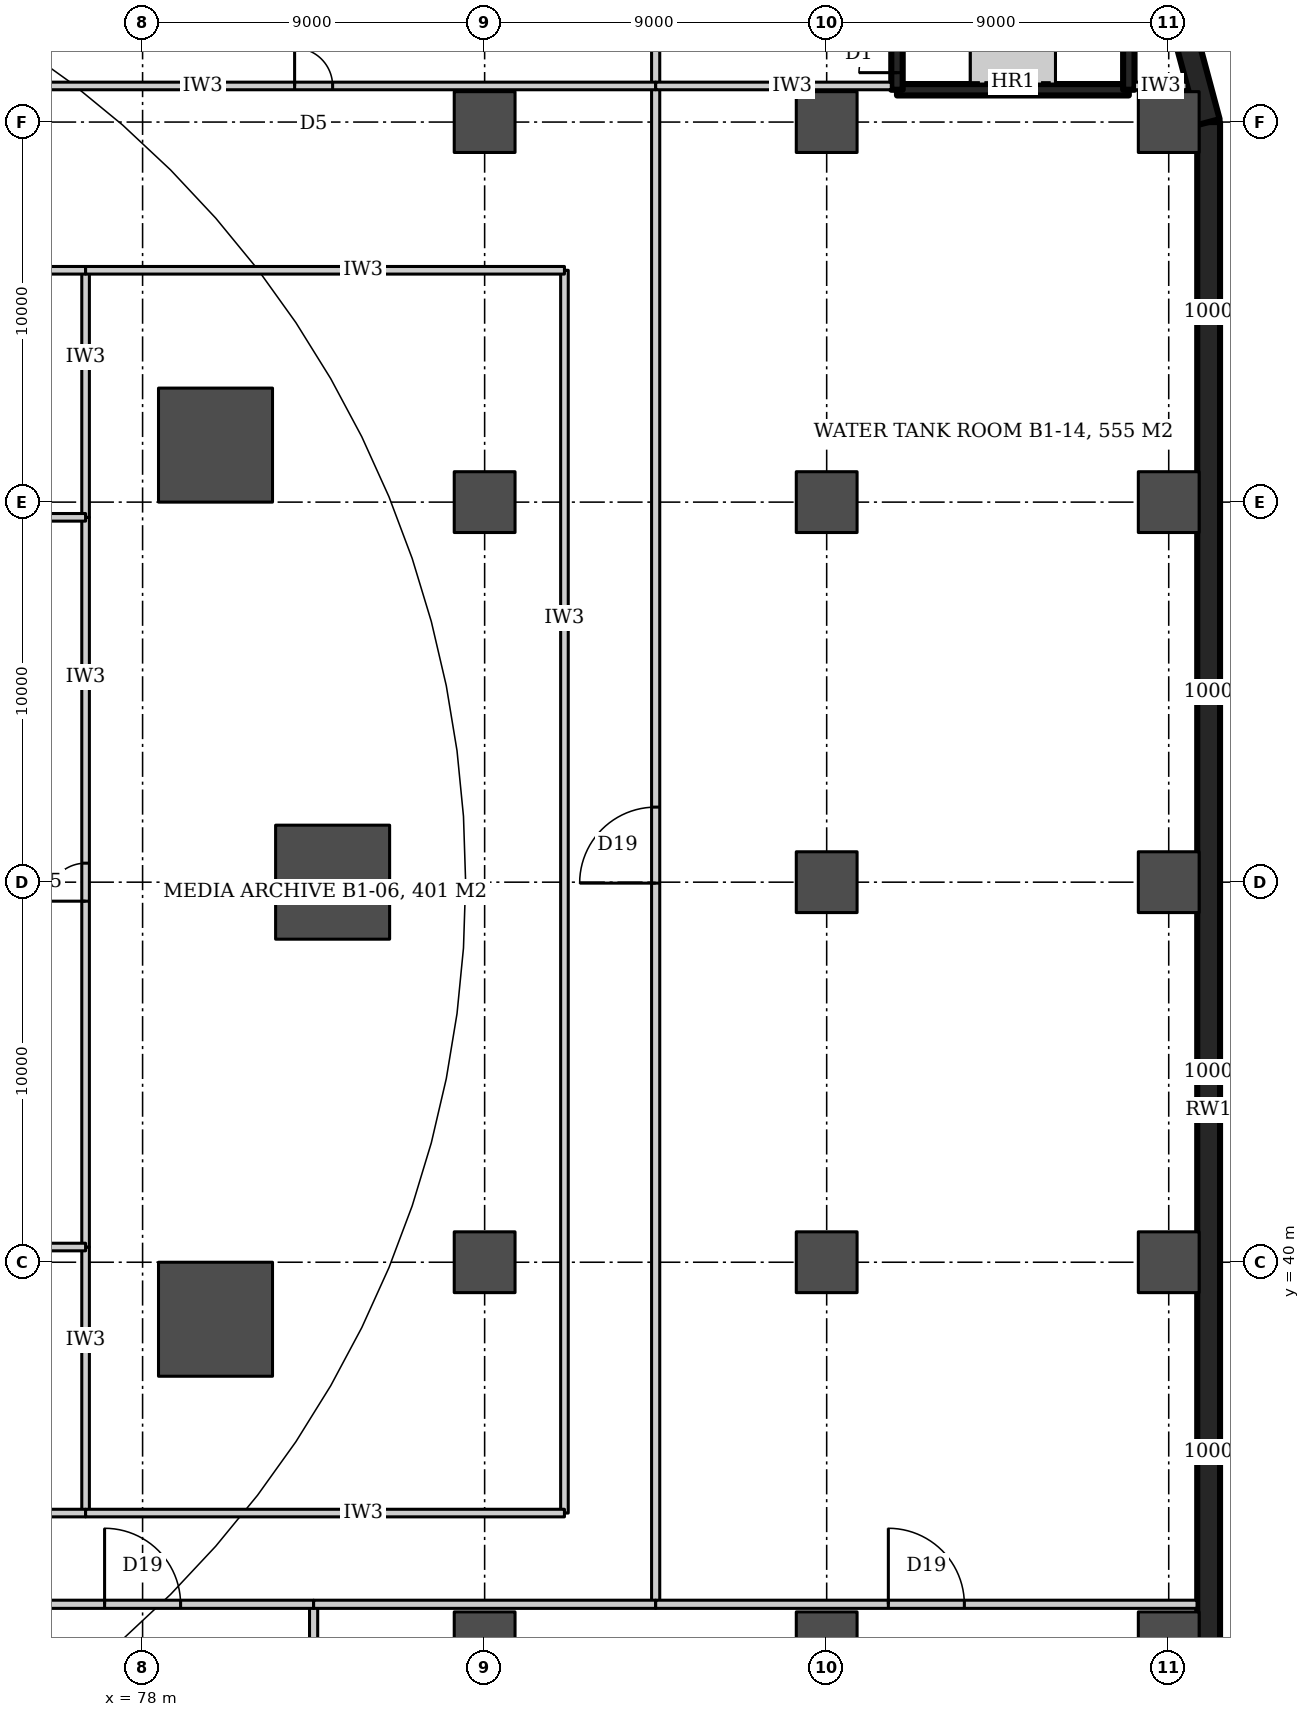
"""IFC4 building model, lengths in metres.
Left out: names, types, materials, properties, quantities, classifications, styles, units other than length and angle.
Written with IfcOpenShell. Run it as: python <this file> out.ifc"""

import sys

from ifc_helpers import new_model, si_unit, direction, frame, frame_2d, origin, origin_2d, place, context, subcontext, project, spatial, rectangle, circle, extrude, element, fill, save


model = new_model("IFC4")
c1 = context("Model", 3, precision=1e-05, world=origin(), true_north=direction((0.0, 1.0)))
c2 = subcontext(c1, "Body", "Model", "MODEL_VIEW")
j1 = project(units=[si_unit("LENGTHUNIT", "METRE"), si_unit("PLANEANGLEUNIT", "RADIAN")], contexts=[c1])
p1 = place(None, origin())
s1 = spatial("IfcSite", under=j1, at=p1, CompositionType="ELEMENT")
p2 = place(p1, origin())
s2 = spatial("IfcBuilding", under=s1, at=p2, CompositionType="ELEMENT")
p3 = place(p2, frame((0.0, 0.0, -6.0)))
s3 = spatial("IfcBuildingStorey", under=s2, at=p3, CompositionType="ELEMENT", Elevation=-6.0)
p4 = place(p3, frame((106.05, 30.0, -0.5), z_axis=(0.0, 0.0, 1.0), x_axis=(0.0, 1.0, 0.0)))
e1 = element("IfcWall", 1, at=p4, inside=s3, PredefinedType="SOLIDWALL", context=c2, shape_type="SweptSolid", body=[
    extrude(rectangle(XDim=40.0, YDim=0.6, at=frame_2d((20.0, 0.0))), origin(), (0.0, 0.0, 1.0), 6.2),
])
p5 = place(p3, frame((106.05, 70.0, -0.5), z_axis=(0.0, 0.0, 1.0), x_axis=(-0.258831381584, 0.965922520654, 0.0)))
e2 = element("IfcWall", 2, at=p5, inside=s3, PredefinedType="SOLIDWALL", context=c2, shape_type="SweptSolid", body=[
    extrude(rectangle(XDim=5.72, YDim=0.6, at=frame_2d((2.86, 0.0))), origin(), (0.0, 0.0, 1.0), 6.2),
])
for number, where, z_axis, x_axis in (
    (3, (87.0, 30.0, -0.5), (0.0, 0.0, 1.0), (1.0, 0.0, 0.0)),
    (4, (96.0, 30.0, -0.5), (0.0, 0.0, 1.0), (1.0, 0.0, 0.0)),
    (5, (105.0, 30.0, -0.5), (0.0, 0.0, 1.0), (1.0, 0.0, 0.0)),
    (6, (87.0, 40.0, -0.5), (0.0, 0.0, 1.0), (1.0, 0.0, 0.0)),
    (7, (96.0, 40.0, -0.5), (0.0, 0.0, 1.0), (1.0, 0.0, 0.0)),
    (8, (105.0, 40.0, -0.5), (0.0, 0.0, 1.0), (1.0, 0.0, 0.0)),
    (9, (96.0, 50.0, -0.5), (0.0, 0.0, 1.0), (1.0, 0.0, 0.0)),
    (10, (105.0, 50.0, -0.5), (0.0, 0.0, 1.0), (1.0, 0.0, 0.0)),
    (11, (87.0, 60.0, -0.5), (0.0, 0.0, 1.0), (1.0, 0.0, 0.0)),
    (12, (96.0, 60.0, -0.5), (0.0, 0.0, 1.0), (1.0, 0.0, 0.0)),
    (13, (105.0, 60.0, -0.5), (0.0, 0.0, 1.0), (1.0, 0.0, 0.0)),
    (14, (87.0, 70.0, -0.5), (0.0, 0.0, 1.0), (1.0, 0.0, 0.0)),
    (15, (96.0, 70.0, -0.5), (0.0, 0.0, 1.0), (1.0, 0.0, 0.0)),
    (16, (105.0, 70.0, -0.5), (0.0, 0.0, 1.0), (1.0, 0.0, 0.0)),
):
    element("IfcColumn", number, at=place(p3, frame(where, z_axis=z_axis, x_axis=x_axis)), inside=s3, PredefinedType="COLUMN", context=c2, shape_type="SweptSolid", body=[
        extrude(rectangle(XDim=1.6, YDim=1.6, at=origin_2d()), origin(), (0.0, 0.0, 1.0), 6.5),
    ])
for number, where, z_axis, x_axis in (
    (17, (83.0, 50.0, 0.0), (0.0, 0.0, 1.0), (1.0, 0.0, 0.0)),
    (18, (79.919, 61.5, 0.0), (0.0, 0.0, 1.0), (1.0, 0.0, 0.0)),
    (19, (79.919, 38.5, 0.0), (0.0, 0.0, 1.0), (1.0, 0.0, 0.0)),
):
    element("IfcColumn", number, at=place(p3, frame(where, z_axis=z_axis, x_axis=x_axis)), inside=s3, PredefinedType="COLUMN", context=c2, shape_type="SweptSolid", body=[
        extrude(circle(Radius=1.5, at=origin_2d()), origin(), (0.0, 0.0, 1.0), 6.0),
    ])
p6 = place(p3, frame((76.5, 33.4, 0.0), z_axis=(0.0, 0.0, 1.0), x_axis=(0.0, 1.0, 0.0)))
e20 = element("IfcWall", 20, at=p6, inside=s3, PredefinedType="PARTITIONING", context=c2, shape_type="SweptSolid", body=[
    extrude(rectangle(XDim=7.0, YDim=0.2, at=frame_2d((3.5, 0.0))), origin(), (0.0, 0.0, 1.0), 3.08),
])
p7 = place(p3, frame((76.5, 40.4, 0.0), z_axis=(0.0, 0.0, 1.0), x_axis=(0.0, 1.0, 0.0)))
e21 = element("IfcWall", 21, at=p7, inside=s3, PredefinedType="PARTITIONING", context=c2, shape_type="SweptSolid", body=[
    extrude(rectangle(XDim=19.2, YDim=0.2, at=frame_2d((9.6, 0.0))), origin(), (0.0, 0.0, 1.0), 3.08),
])
p8 = place(p7, frame((9.1, 0.0, 0.0)))
e22 = element("IfcOpeningElement", 22, at=p8, cuts=e21, PredefinedType="OPENING", context=c2, shape_type="SweptSolid", body=[
    extrude(rectangle(XDim=1.0, YDim=2.1, at=frame_2d((0.5, 1.05))), frame((0.0, 0.11, 0.0), z_axis=(0.0, -1.0, 0.0), x_axis=(1.0, 0.0, 0.0)), (0.0, 0.0, 1.0), 0.22),
])
p9 = place(p3, frame((76.5, 59.6, 0.0), z_axis=(0.0, 0.0, 1.0), x_axis=(0.0, 1.0, 0.0)))
e23 = element("IfcWall", 23, at=p9, inside=s3, PredefinedType="PARTITIONING", context=c2, shape_type="SweptSolid", body=[
    extrude(rectangle(XDim=6.5, YDim=0.2, at=frame_2d((3.25, 0.0))), origin(), (0.0, 0.0, 1.0), 3.08),
])
p10 = place(p3, frame((82.5, 19.255, 0.0), z_axis=(0.0, 0.0, 1.0), x_axis=(0.0, 1.0, 0.0)))
e24 = element("IfcWall", 24, at=p10, inside=s3, PredefinedType="PARTITIONING", context=c2, shape_type="SweptSolid", body=[
    extrude(rectangle(XDim=11.745, YDim=0.215, at=frame_2d((5.873, 0.0))), origin(), (0.0, 0.0, 1.0), 3.68),
])
p11 = place(p3, frame((89.1, 33.4, 0.0), z_axis=(0.0, 0.0, 1.0), x_axis=(0.0, 1.0, 0.0)))
e25 = element("IfcWall", 25, at=p11, inside=s3, PredefinedType="PARTITIONING", context=c2, shape_type="SweptSolid", body=[
    extrude(rectangle(XDim=32.7, YDim=0.2, at=frame_2d((16.35, 0.0))), origin(), (0.0, 0.0, 1.0), 3.68),
])
p12 = place(p3, frame((91.5, 31.0, 0.0), z_axis=(0.0, 0.0, 1.0), x_axis=(0.0, 1.0, 0.0)))
e26 = element("IfcWall", 26, at=p12, inside=s3, PredefinedType="PARTITIONING", context=c2, shape_type="SweptSolid", body=[
    extrude(rectangle(XDim=39.95, YDim=0.215, at=frame_2d((19.975, 0.0))), origin(), (0.0, 0.0, 1.0), 3.68),
])
p13 = place(p12, frame((18.975, 0.0, 0.0)))
e27 = element("IfcOpeningElement", 27, at=p13, cuts=e26, PredefinedType="OPENING", context=c2, shape_type="SweptSolid", body=[
    extrude(rectangle(XDim=2.0, YDim=2.4, at=frame_2d((1.0, 1.2))), frame((0.0, 0.117, 0.0), z_axis=(0.0, -1.0, 0.0), x_axis=(1.0, 0.0, 0.0)), (0.0, 0.0, 1.0), 0.235),
])
p14 = place(p3, frame((91.5, 70.95, 0.0), z_axis=(0.0, 0.0, 1.0), x_axis=(0.0, 1.0, 0.0)))
e28 = element("IfcWall", 28, at=p14, inside=s3, PredefinedType="PARTITIONING", context=c2, shape_type="SweptSolid", body=[
    extrude(rectangle(XDim=9.795, YDim=0.215, at=frame_2d((4.897, 0.0))), origin(), (0.0, 0.0, 1.0), 3.68),
])
p15 = place(p3, frame((73.5, 31.0, 0.0), z_axis=(0.0, 0.0, 1.0), x_axis=(1.0, 0.0, 0.0)))
e29 = element("IfcWall", 29, at=p15, inside=s3, PredefinedType="PARTITIONING", context=c2, shape_type="SweptSolid", body=[
    extrude(rectangle(XDim=9.0, YDim=0.215, at=frame_2d((4.5, 0.0))), origin(), (0.0, 0.0, 1.0), 3.68),
])
p16 = place(p15, frame((3.5, 0.0, 0.0)))
e30 = element("IfcOpeningElement", 30, at=p16, cuts=e29, PredefinedType="OPENING", context=c2, shape_type="SweptSolid", body=[
    extrude(rectangle(XDim=2.0, YDim=2.4, at=frame_2d((1.0, 1.2))), frame((0.0, 0.117, 0.0), z_axis=(0.0, -1.0, 0.0), x_axis=(1.0, 0.0, 0.0)), (0.0, 0.0, 1.0), 0.235),
])
p17 = place(p3, frame((82.5, 31.0, 0.0), z_axis=(0.0, 0.0, 1.0), x_axis=(1.0, 0.0, 0.0)))
e31 = element("IfcWall", 31, at=p17, inside=s3, PredefinedType="PARTITIONING", context=c2, shape_type="SweptSolid", body=[
    extrude(rectangle(XDim=9.0, YDim=0.215, at=frame_2d((4.5, 0.0))), origin(), (0.0, 0.0, 1.0), 3.68),
])
p18 = place(p3, frame((91.5, 31.0, 0.0), z_axis=(0.0, 0.0, 1.0), x_axis=(1.0, 0.0, 0.0)))
e32 = element("IfcWall", 32, at=p18, inside=s3, PredefinedType="PARTITIONING", context=c2, shape_type="SweptSolid", body=[
    extrude(rectangle(XDim=14.245, YDim=0.215, at=frame_2d((7.123, 0.0))), origin(), (0.0, 0.0, 1.0), 3.68),
])
p19 = place(p18, frame((6.123, 0.0, 0.0)))
e33 = element("IfcOpeningElement", 33, at=p19, cuts=e32, PredefinedType="OPENING", context=c2, shape_type="SweptSolid", body=[
    extrude(rectangle(XDim=2.0, YDim=2.4, at=frame_2d((1.0, 1.2))), frame((0.0, 0.117, 0.0), z_axis=(0.0, -1.0, 0.0), x_axis=(1.0, 0.0, 0.0)), (0.0, 0.0, 1.0), 0.235),
])
p20 = place(p3, frame((64.7, 33.4, 0.0), z_axis=(0.0, 0.0, 1.0), x_axis=(1.0, 0.0, 0.0)))
e34 = element("IfcWall", 34, at=p20, inside=s3, PredefinedType="PARTITIONING", context=c2, shape_type="SweptSolid", body=[
    extrude(rectangle(XDim=11.8, YDim=0.2, at=frame_2d((5.9, 0.0))), origin(), (0.0, 0.0, 1.0), 3.08),
])
p21 = place(p20, frame((5.4, 0.0, 0.0)))
e35 = element("IfcOpeningElement", 35, at=p21, cuts=e34, PredefinedType="OPENING", context=c2, shape_type="SweptSolid", body=[
    extrude(rectangle(XDim=1.0, YDim=2.1, at=frame_2d((0.5, 1.05))), frame((0.0, 0.11, 0.0), z_axis=(0.0, -1.0, 0.0), x_axis=(1.0, 0.0, 0.0)), (0.0, 0.0, 1.0), 0.22),
])
p22 = place(p3, frame((76.5, 33.4, 0.0), z_axis=(0.0, 0.0, 1.0), x_axis=(1.0, 0.0, 0.0)))
e36 = element("IfcWall", 36, at=p22, inside=s3, PredefinedType="PARTITIONING", context=c2, shape_type="SweptSolid", body=[
    extrude(rectangle(XDim=12.6, YDim=0.2, at=frame_2d((6.3, 0.0))), origin(), (0.0, 0.0, 1.0), 3.68),
])
for number, where, z_axis, x_axis in (
    (37, (64.7, 40.4, 0.0), (0.0, 0.0, 1.0), (1.0, 0.0, 0.0)),
    (38, (64.7, 59.6, 0.0), (0.0, 0.0, 1.0), (1.0, 0.0, 0.0)),
):
    element("IfcWall", number, at=place(p3, frame(where, z_axis=z_axis, x_axis=x_axis)), inside=s3, PredefinedType="PARTITIONING", context=c2, shape_type="SweptSolid", body=[
        extrude(rectangle(XDim=11.8, YDim=0.2, at=frame_2d((5.9, 0.0))), origin(), (0.0, 0.0, 1.0), 2.48),
    ])
p23 = place(p3, frame((64.7, 66.1, 0.0), z_axis=(0.0, 0.0, 1.0), x_axis=(1.0, 0.0, 0.0)))
e39 = element("IfcWall", 39, at=p23, inside=s3, PredefinedType="PARTITIONING", context=c2, shape_type="SweptSolid", body=[
    extrude(rectangle(XDim=11.8, YDim=0.2, at=frame_2d((5.9, 0.0))), origin(), (0.0, 0.0, 1.0), 3.08),
])
p24 = place(p23, frame((4.7, 0.0, 0.0)))
e40 = element("IfcOpeningElement", 40, at=p24, cuts=e39, PredefinedType="OPENING", context=c2, shape_type="SweptSolid", body=[
    extrude(rectangle(XDim=2.4, YDim=2.7, at=frame_2d((1.2, 1.35))), frame((0.0, 0.11, 0.0), z_axis=(0.0, -1.0, 0.0), x_axis=(1.0, 0.0, 0.0)), (0.0, 0.0, 1.0), 0.22),
])
p25 = place(p3, frame((76.5, 66.1, 0.0), z_axis=(0.0, 0.0, 1.0), x_axis=(1.0, 0.0, 0.0)))
e41 = element("IfcWall", 41, at=p25, inside=s3, PredefinedType="PARTITIONING", context=c2, shape_type="SweptSolid", body=[
    extrude(rectangle(XDim=12.6, YDim=0.2, at=frame_2d((6.3, 0.0))), origin(), (0.0, 0.0, 1.0), 3.68),
])
p26 = place(p3, frame((73.5, 70.95, 0.0), z_axis=(0.0, 0.0, 1.0), x_axis=(1.0, 0.0, 0.0)))
e42 = element("IfcWall", 42, at=p26, inside=s3, PredefinedType="PARTITIONING", context=c2, shape_type="SweptSolid", body=[
    extrude(rectangle(XDim=18.0, YDim=0.2, at=frame_2d((9.0, 0.0))), origin(), (0.0, 0.0, 1.0), 3.68),
])
p27 = place(p26, frame((8.5, 0.0, 0.0)))
e43 = element("IfcOpeningElement", 43, at=p27, cuts=e42, PredefinedType="OPENING", context=c2, shape_type="SweptSolid", body=[
    extrude(rectangle(XDim=1.0, YDim=2.1, at=frame_2d((0.5, 1.05))), frame((0.0, 0.11, 0.0), z_axis=(0.0, -1.0, 0.0), x_axis=(1.0, 0.0, 0.0)), (0.0, 0.0, 1.0), 0.22),
])
p28 = place(p3, frame((91.5, 70.95, 0.0), z_axis=(0.0, 0.0, 1.0), x_axis=(1.0, 0.0, 0.0)))
e44 = element("IfcWall", 44, at=p28, inside=s3, PredefinedType="PARTITIONING", context=c2, shape_type="SweptSolid", body=[
    extrude(rectangle(XDim=6.2, YDim=0.2, at=frame_2d((3.1, 0.0))), origin(), (0.0, 0.0, 1.0), 4.1),
])
p29 = place(p3, frame((104.1, 70.95, 0.0), z_axis=(0.0, 0.0, 1.0), x_axis=(1.0, 0.0, 0.0)))
e45 = element("IfcWall", 45, at=p29, inside=s3, PredefinedType="PARTITIONING", context=c2, shape_type="SweptSolid", body=[
    extrude(rectangle(XDim=1.38, YDim=0.2, at=frame_2d((0.69, 0.0))), origin(), (0.0, 0.0, 1.0), 4.1),
])
p30 = place(p3, frame((97.85, 70.85, 0.0), z_axis=(0.0, 0.0, 1.0), x_axis=(1.0, 0.0, 0.0)))
e46 = element("IfcWall", 46, at=p30, inside=s3, PredefinedType="SHEAR", context=c2, shape_type="SweptSolid", body=[
    extrude(rectangle(XDim=6.1, YDim=0.3, at=frame_2d((3.05, 0.0))), origin(), (0.0, 0.0, 1.0), 6.0),
])
p31 = place(p3, frame((97.85, 70.85, 0.0), z_axis=(0.0, 0.0, 1.0), x_axis=(0.0, 1.0, 0.0)))
e47 = element("IfcWall", 47, at=p31, inside=s3, PredefinedType="SHEAR", context=c2, shape_type="SweptSolid", body=[
    extrude(rectangle(XDim=3.2, YDim=0.3, at=frame_2d((1.6, 0.0))), origin(), (0.0, 0.0, 1.0), 6.0),
])
p32 = place(p31, frame((0.45, 0.0, 0.0)))
e48 = element("IfcOpeningElement", 48, at=p32, cuts=e47, PredefinedType="OPENING", context=c2, shape_type="SweptSolid", body=[
    extrude(rectangle(XDim=1.0, YDim=2.1, at=frame_2d((0.5, 1.05))), frame((0.0, 0.16, 0.0), z_axis=(0.0, -1.0, 0.0), x_axis=(1.0, 0.0, 0.0)), (0.0, 0.0, 1.0), 0.32),
])
p33 = place(p3, frame((103.95, 70.85, 0.0), z_axis=(0.0, 0.0, 1.0), x_axis=(0.0, 1.0, 0.0)))
e49 = element("IfcWall", 49, at=p33, inside=s3, PredefinedType="SHEAR", context=c2, shape_type="SweptSolid", body=[
    extrude(rectangle(XDim=3.2, YDim=0.3, at=frame_2d((1.6, 0.0))), origin(), (0.0, 0.0, 1.0), 6.0),
])
p34 = place(p16, origin())
e50 = element("IfcDoor", 50, at=p34, inside=s3, OperationType="DOUBLE_DOOR_DOUBLE_SWING", PredefinedType="DOOR", context=c2, shape_type="SweptSolid", body=[
    extrude(rectangle(XDim=2.0, YDim=2.4, at=frame_2d((1.0, 1.2))), frame((0.0, 0.025, 0.0), z_axis=(0.0, -1.0, 0.0), x_axis=(1.0, 0.0, 0.0)), (0.0, 0.0, 1.0), 0.05),
])
fill(e30, e50)
p35 = place(p19, origin())
e51 = element("IfcDoor", 51, at=p35, inside=s3, OperationType="DOUBLE_DOOR_DOUBLE_SWING", PredefinedType="DOOR", context=c2, shape_type="SweptSolid", body=[
    extrude(rectangle(XDim=2.0, YDim=2.4, at=frame_2d((1.0, 1.2))), frame((0.0, 0.025, 0.0), z_axis=(0.0, -1.0, 0.0), x_axis=(1.0, 0.0, 0.0)), (0.0, 0.0, 1.0), 0.05),
])
fill(e33, e51)
p36 = place(p13, origin())
e52 = element("IfcDoor", 52, at=p36, inside=s3, OperationType="DOUBLE_DOOR_DOUBLE_SWING", PredefinedType="DOOR", context=c2, shape_type="SweptSolid", body=[
    extrude(rectangle(XDim=2.0, YDim=2.4, at=frame_2d((1.0, 1.2))), frame((0.0, 0.025, 0.0), z_axis=(0.0, -1.0, 0.0), x_axis=(1.0, 0.0, 0.0)), (0.0, 0.0, 1.0), 0.05),
])
fill(e27, e52)
p37 = place(p27, origin())
e53 = element("IfcDoor", 53, at=p37, inside=s3, OperationType="SINGLE_SWING_LEFT", PredefinedType="DOOR", context=c2, shape_type="SweptSolid", body=[
    extrude(rectangle(XDim=1.0, YDim=2.1, at=frame_2d((0.5, 1.05))), frame((0.0, 0.025, 0.0), z_axis=(0.0, -1.0, 0.0), x_axis=(1.0, 0.0, 0.0)), (0.0, 0.0, 1.0), 0.05),
])
fill(e43, e53)
p38 = place(p8, origin())
e54 = element("IfcDoor", 54, at=p38, inside=s3, OperationType="SINGLE_SWING_LEFT", PredefinedType="DOOR", context=c2, shape_type="SweptSolid", body=[
    extrude(rectangle(XDim=1.0, YDim=2.1, at=frame_2d((0.5, 1.05))), frame((0.0, 0.025, 0.0), z_axis=(0.0, -1.0, 0.0), x_axis=(1.0, 0.0, 0.0)), (0.0, 0.0, 1.0), 0.05),
])
fill(e22, e54)
p39 = place(p32, origin())
e55 = element("IfcDoor", 55, at=p39, inside=s3, OperationType="SINGLE_SWING_LEFT", PredefinedType="DOOR", context=c2, shape_type="SweptSolid", body=[
    extrude(rectangle(XDim=1.0, YDim=2.1, at=frame_2d((0.5, 1.05))), frame((0.0, 0.025, 0.0), z_axis=(0.0, -1.0, 0.0), x_axis=(1.0, 0.0, 0.0)), (0.0, 0.0, 1.0), 0.05),
])
fill(e48, e55)
save(model, sys.argv[1])
